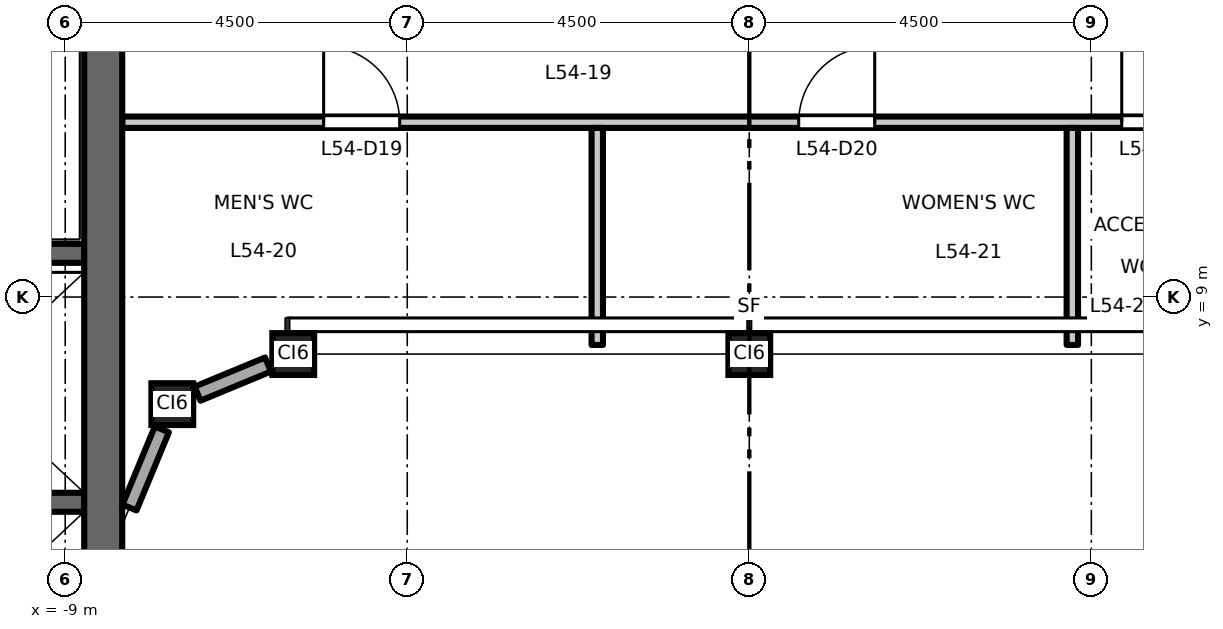
"""IFC4 building model, lengths in metres.
Left out: names, types, materials, properties, quantities, classifications, styles, units other than length and angle.
Written with IfcOpenShell. Run it as: python <this file> out.ifc"""

import sys

from ifc_helpers import new_model, si_unit, direction, frame, frame_2d, origin, origin_2d, place, context, subcontext, project, spatial, rectangle, hollow_rectangle, extrude, element, fill, save


model = new_model("IFC4")
c1 = context("Model", 3, precision=1e-05, world=origin(), true_north=direction((0.0, 1.0)))
c2 = subcontext(c1, "Body", "Model", "MODEL_VIEW")
j1 = project(units=[si_unit("LENGTHUNIT", "METRE"), si_unit("PLANEANGLEUNIT", "RADIAN")], contexts=[c1])
p1 = place(None, origin())
s1 = spatial("IfcSite", under=j1, at=p1, CompositionType="ELEMENT")
p2 = place(p1, origin())
s2 = spatial("IfcBuilding", under=s1, at=p2, CompositionType="ELEMENT")
p3 = place(p2, frame((0.0, 0.0, 251.2)))
s3 = spatial("IfcBuildingStorey", under=s2, at=p3, CompositionType="ELEMENT", Elevation=251.2)
for number, where, z_axis, x_axis in (
    (1, (-7.591, 7.591, 0.0), (0.0, 0.0, 1.0), (1.0, 0.0, 0.0)),
    (2, (-6.0, 8.25, 0.0), (0.0, 0.0, 1.0), (1.0, 0.0, 0.0)),
    (3, (0.0, 8.25, 0.0), (0.0, 0.0, 1.0), (1.0, 0.0, 0.0)),
):
    element("IfcColumn", number, at=place(p3, frame(where, z_axis=z_axis, x_axis=x_axis)), inside=s3, PredefinedType="COLUMN", context=c2, shape_type="SweptSolid", body=[
        extrude(hollow_rectangle(XDim=0.55, YDim=0.55, WallThickness=0.028, at=origin_2d()), origin(), (0.0, 0.0, 1.0), 4.5),
    ])
p4 = place(p3, frame((-8.75, 6.3, 0.0), z_axis=(0.0, 0.0, 1.0), x_axis=(-1.0, 0.0, 0.0)))
e4 = element("IfcWall", 4, at=p4, inside=s3, PredefinedType="SHEAR", context=c2, shape_type="SweptSolid", body=[
    extrude(rectangle(XDim=3.1, YDim=0.25, at=frame_2d((1.55, 0.0))), origin(), (0.0, 0.0, 1.0), 4.35),
])
p5 = place(p3, frame((-8.75, 9.575, 0.0), z_axis=(0.0, 0.0, 1.0), x_axis=(-1.0, 0.0, 0.0)))
e5 = element("IfcWall", 5, at=p5, inside=s3, PredefinedType="SHEAR", context=c2, shape_type="SweptSolid", body=[
    extrude(rectangle(XDim=8.0, YDim=0.25, at=frame_2d((4.0, 0.0))), origin(), (0.0, 0.0, 1.0), 4.35),
])
p6 = place(p5, frame((6.65, 0.0, 0.0)))
e6 = element("IfcOpeningElement", 6, at=p6, cuts=e5, PredefinedType="OPENING", context=c2, shape_type="SweptSolid", body=[
    extrude(rectangle(XDim=1.1, YDim=2.1, at=frame_2d((0.55, 1.05))), frame((0.0, 0.135, 0.0), z_axis=(0.0, -1.0, 0.0), x_axis=(1.0, 0.0, 0.0)), (0.0, 0.0, 1.0), 0.27),
])
p7 = place(p3, frame((-8.5, -13.0, 0.0), z_axis=(0.0, 0.0, 1.0), x_axis=(0.0, 1.0, 0.0)))
e7 = element("IfcWall", 7, at=p7, inside=s3, PredefinedType="SHEAR", context=c2, shape_type="SweptSolid", body=[
    extrude(rectangle(XDim=26.0, YDim=0.5, at=frame_2d((13.0, 0.0))), origin(), (0.0, 0.0, 1.0), 4.35),
])
p8 = place(p3, frame((-6.332, 8.113, 0.0), z_axis=(0.0, 0.0, 1.0), x_axis=(-0.923859650767, -0.382731427616, 0.0)))
e8 = element("IfcWall", 8, at=p8, inside=s3, PredefinedType="STANDARD", context=c2, shape_type="SweptSolid", body=[
    extrude(rectangle(XDim=1.003, YDim=0.2, at=frame_2d((0.502, 0.0))), origin(), (0.0, 0.0, 1.0), 3.918),
])
p9 = place(p3, frame((-7.729, 7.259, 0.0), z_axis=(0.0, 0.0, 1.0), x_axis=(-0.382635994082, -0.923899180665, 0.0)))
e9 = element("IfcWall", 9, at=p9, inside=s3, PredefinedType="STANDARD", context=c2, shape_type="SweptSolid", body=[
    extrude(rectangle(XDim=1.113, YDim=0.2, at=frame_2d((0.556, 0.0))), origin(), (0.0, 0.0, 1.0), 3.918),
])
p10 = place(p3, frame((-8.25, 11.3, 0.0), z_axis=(0.0, 0.0, 1.0), x_axis=(1.0, 0.0, 0.0)))
e10 = element("IfcWall", 10, at=p10, inside=s3, PredefinedType="PARTITIONING", context=c2, shape_type="SweptSolid", body=[
    extrude(rectangle(XDim=15.05, YDim=0.15, at=frame_2d((7.525, 0.0))), origin(), (0.0, 0.0, 1.0), 4.35),
])
p11 = place(p10, frame((2.65, 0.0, 0.0)))
e11 = element("IfcOpeningElement", 11, at=p11, cuts=e10, PredefinedType="OPENING", context=c2, shape_type="SweptSolid", body=[
    extrude(rectangle(XDim=1.0, YDim=2.1, at=frame_2d((0.5, 1.05))), frame((0.0, 0.085, 0.0), z_axis=(0.0, -1.0, 0.0), x_axis=(1.0, 0.0, 0.0)), (0.0, 0.0, 1.0), 0.17),
])
p12 = place(p10, frame((8.9, 0.0, 0.0)))
e12 = element("IfcOpeningElement", 12, at=p12, cuts=e10, PredefinedType="OPENING", context=c2, shape_type="SweptSolid", body=[
    extrude(rectangle(XDim=1.0, YDim=2.1, at=frame_2d((0.5, 1.05))), frame((0.0, 0.085, 0.0), z_axis=(0.0, -1.0, 0.0), x_axis=(1.0, 0.0, 0.0)), (0.0, 0.0, 1.0), 0.17),
])
p13 = place(p10, frame((13.15, 0.0, 0.0)))
e13 = element("IfcOpeningElement", 13, at=p13, cuts=e10, PredefinedType="OPENING", context=c2, shape_type="SweptSolid", body=[
    extrude(rectangle(XDim=1.0, YDim=2.1, at=frame_2d((0.5, 1.05))), frame((0.0, 0.085, 0.0), z_axis=(0.0, -1.0, 0.0), x_axis=(1.0, 0.0, 0.0)), (0.0, 0.0, 1.0), 0.17),
])
for number, where, z_axis, x_axis in (
    (14, (-2.0, 8.37, 0.0), (0.0, 0.0, 1.0), (0.0, 1.0, 0.0)),
    (15, (4.25, 8.37, 0.0), (0.0, 0.0, 1.0), (0.0, 1.0, 0.0)),
):
    element("IfcWall", number, at=place(p3, frame(where, z_axis=z_axis, x_axis=x_axis)), inside=s3, PredefinedType="PARTITIONING", context=c2, shape_type="SweptSolid", body=[
        extrude(rectangle(XDim=2.855, YDim=0.15, at=frame_2d((1.427, 0.0))), origin(), (0.0, 0.0, 1.0), 4.35),
    ])
p14 = place(p11, origin())
e16 = element("IfcDoor", 16, at=p14, inside=s3, OperationType="SINGLE_SWING_LEFT", PredefinedType="DOOR", context=c2, shape_type="SweptSolid", body=[
    extrude(rectangle(XDim=1.0, YDim=2.1, at=frame_2d((0.5, 1.05))), frame((0.0, 0.025, 0.0), z_axis=(0.0, -1.0, 0.0), x_axis=(1.0, 0.0, 0.0)), (0.0, 0.0, 1.0), 0.05),
])
fill(e11, e16)
p15 = place(p12, origin())
e17 = element("IfcDoor", 17, at=p15, inside=s3, OperationType="SINGLE_SWING_RIGHT", PredefinedType="DOOR", context=c2, shape_type="SweptSolid", body=[
    extrude(rectangle(XDim=1.0, YDim=2.1, at=frame_2d((0.5, 1.05))), frame((0.0, 0.025, 0.0), z_axis=(0.0, -1.0, 0.0), x_axis=(1.0, 0.0, 0.0)), (0.0, 0.0, 1.0), 0.05),
])
fill(e12, e17)
p16 = place(p13, origin())
e18 = element("IfcDoor", 18, at=p16, inside=s3, OperationType="SINGLE_SWING_LEFT", PredefinedType="DOOR", context=c2, shape_type="SweptSolid", body=[
    extrude(rectangle(XDim=1.0, YDim=2.1, at=frame_2d((0.5, 1.05))), frame((0.0, 0.025, 0.0), z_axis=(0.0, -1.0, 0.0), x_axis=(1.0, 0.0, 0.0)), (0.0, 0.0, 1.0), 0.05),
])
fill(e13, e18)
save(model, sys.argv[1])
